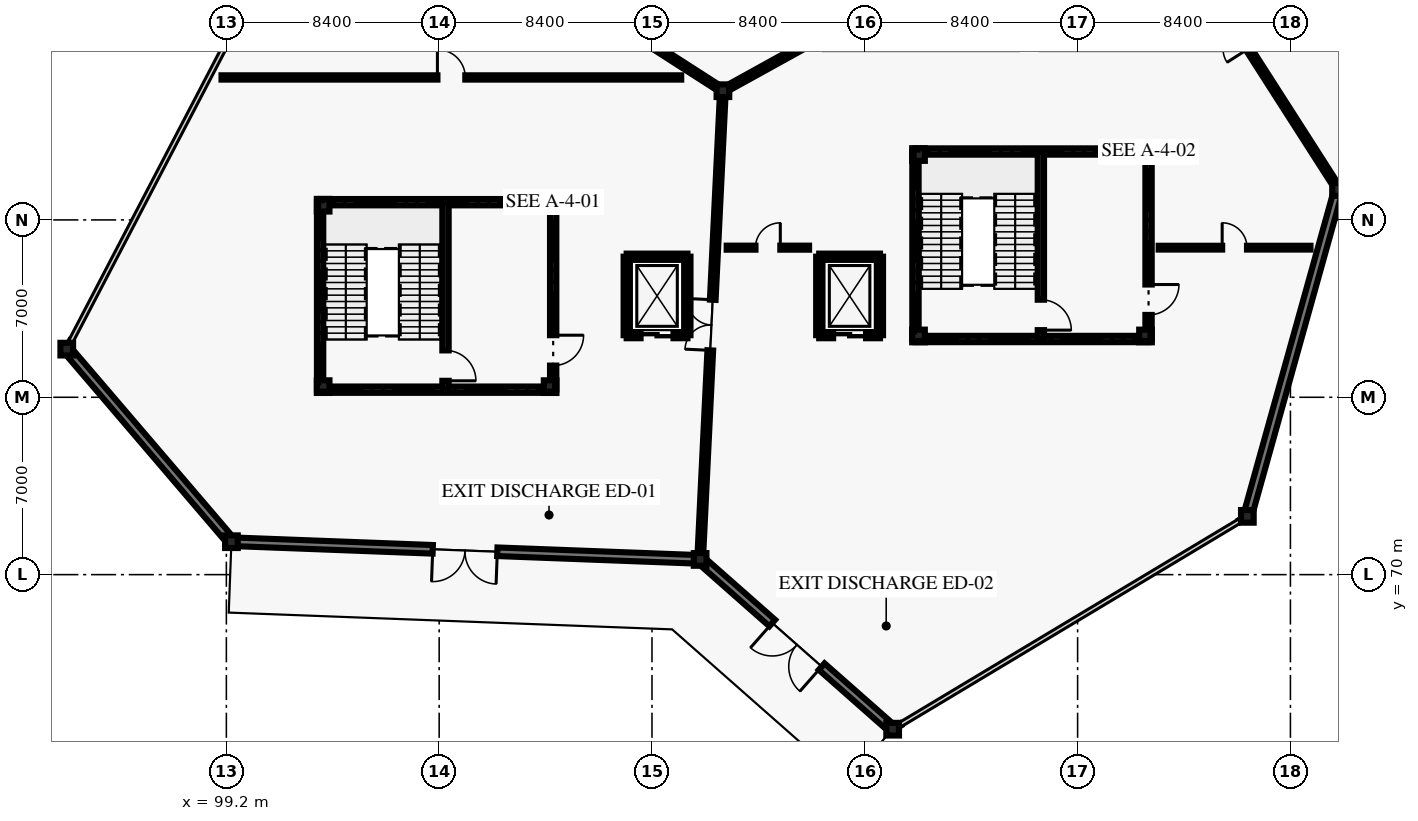
"""IFC4 building model, lengths in metres.
Left out: names, types, materials, properties, quantities, classifications, styles, units other than length and angle.
Written with IfcOpenShell. Run it as: python <this file> out.ifc"""

import sys

from ifc_helpers import new_model, si_unit, direction, frame, frame_2d, origin, origin_2d, place, context, subcontext, project, spatial, rectangle, i_section, extrude, element, fill, save


model = new_model("IFC4")
c1 = context("Model", 3, precision=1e-05, world=origin(), true_north=direction((0.0, 1.0)))
c2 = subcontext(c1, "Body", "Model", "MODEL_VIEW")
j1 = project(units=[si_unit("LENGTHUNIT", "METRE"), si_unit("PLANEANGLEUNIT", "RADIAN")], contexts=[c1])
p1 = place(None, origin())
s1 = spatial("IfcSite", under=j1, at=p1, CompositionType="ELEMENT")
p2 = place(p1, origin())
s2 = spatial("IfcBuilding", under=s1, at=p2, CompositionType="ELEMENT")
p3 = place(p2, origin())
s3 = spatial("IfcBuildingStorey", under=s2, at=p3, CompositionType="ELEMENT", Elevation=0.0)
for number, where, z_axis, x_axis in (
    (1, (92.9, 78.9, 0.0), (0.0, 0.0, 1.0), (1.0, 0.0, 0.0)),
    (2, (99.4, 71.3, 0.0), (0.0, 0.0, 1.0), (1.0, 0.0, 0.0)),
    (3, (117.9, 70.6, 0.0), (0.0, 0.0, 1.0), (1.0, 0.0, 0.0)),
    (4, (118.8, 89.1, 0.0), (0.0, 0.0, 1.0), (1.0, 0.0, 0.0)),
    (5, (125.5, 63.9, 0.0), (0.0, 0.0, 1.0), (1.0, 0.0, 0.0)),
    (6, (139.5, 72.3, 0.0), (0.0, 0.0, 1.0), (1.0, 0.0, 0.0)),
    (7, (143.1, 85.2, 0.0), (0.0, 0.0, 1.0), (1.0, 0.0, 0.0)),
    (8, (103.02, 77.42, 0.0), (0.0, 0.0, 1.0), (1.0, 0.0, 0.0)),
    (9, (111.98, 77.42, 0.0), (0.0, 0.0, 1.0), (1.0, 0.0, 0.0)),
    (10, (111.98, 84.58, 0.0), (0.0, 0.0, 1.0), (1.0, 0.0, 0.0)),
    (11, (103.02, 84.58, 0.0), (0.0, 0.0, 1.0), (1.0, 0.0, 0.0)),
    (12, (126.52, 79.42, 0.0), (0.0, 0.0, 1.0), (1.0, 0.0, 0.0)),
    (13, (135.48, 79.42, 0.0), (0.0, 0.0, 1.0), (1.0, 0.0, 0.0)),
    (14, (135.48, 86.58, 0.0), (0.0, 0.0, 1.0), (1.0, 0.0, 0.0)),
    (15, (126.52, 86.58, 0.0), (0.0, 0.0, 1.0), (1.0, 0.0, 0.0)),
):
    element("IfcColumn", number, at=place(p3, frame(where, z_axis=z_axis, x_axis=x_axis)), inside=s3, PredefinedType="COLUMN", context=c2, shape_type="SweptSolid", body=[
        extrude(i_section(OverallWidth=0.5, OverallDepth=0.5, WebThickness=0.022, FlangeThickness=0.036, at=origin_2d()), origin(), (0.0, 0.0, 1.0), 5.4),
    ])
p4 = place(p3, frame((117.84, 70.602, 0.0), z_axis=(0.0, 0.0, 1.0), x_axis=(-0.999284381651, 0.037824920194, 0.0)))
e16 = element("IfcWall", 16, at=p4, inside=s3, PredefinedType="SOLIDWALL", context=c2, shape_type="SweptSolid", body=[
    extrude(rectangle(XDim=18.453, YDim=0.34, at=frame_2d((9.227, 0.0))), origin(), (0.0, 0.0, 1.0), 4.22),
])
p5 = place(p4, frame((7.951, 0.0, 0.0)))
e17 = element("IfcOpeningElement", 17, at=p5, cuts=e16, PredefinedType="OPENING", context=c2, shape_type="SweptSolid", body=[
    extrude(rectangle(XDim=2.55, YDim=2.5, at=frame_2d((1.275, 1.25))), frame((0.0, 0.18, 0.0), z_axis=(0.0, -1.0, 0.0), x_axis=(1.0, 0.0, 0.0)), (0.0, 0.0, 1.0), 0.36),
])
p6 = place(p3, frame((92.919, 78.937, 0.0), z_axis=(0.0, 0.0, 1.0), x_axis=(0.464243799771, 0.885707454171, 0.0)))
e18 = element("IfcWall", 18, at=p6, inside=s3, PredefinedType="SOLIDWALL", context=c2, shape_type="SweptSolid", body=[
    extrude(rectangle(XDim=0.308, YDim=0.095, at=frame_2d((0.154, 0.0))), origin(), (0.0, 0.0, 1.0), 4.22),
])
p7 = place(p3, frame((99.4, 71.3, 0.0), z_axis=(0.0, 0.0, 1.0), x_axis=(-0.649974737731, 0.75995581471, 0.0)))
e19 = element("IfcWall", 19, at=p7, inside=s3, PredefinedType="SOLIDWALL", context=c2, shape_type="SweptSolid", body=[
    extrude(rectangle(XDim=10.0, YDim=0.34, at=frame_2d((5.0, 0.0))), origin(), (0.0, 0.0, 1.0), 4.22),
])
p8 = place(p3, frame((125.5, 63.9, 0.0), z_axis=(0.0, 0.0, 1.0), x_axis=(-0.750131359252, 0.661288850554, 0.0)))
e20 = element("IfcWall", 20, at=p8, inside=s3, PredefinedType="SOLIDWALL", context=c2, shape_type="SweptSolid", body=[
    extrude(rectangle(XDim=10.072, YDim=0.34, at=frame_2d((5.036, 0.0))), origin(), (0.0, 0.0, 1.0), 4.22),
])
p9 = place(p8, frame((3.736, 0.0, 0.0)))
e21 = element("IfcOpeningElement", 21, at=p9, cuts=e20, PredefinedType="OPENING", context=c2, shape_type="SweptSolid", body=[
    extrude(rectangle(XDim=2.6, YDim=2.55, at=frame_2d((1.3, 1.275))), frame((0.0, 0.18, 0.0), z_axis=(0.0, -1.0, 0.0), x_axis=(1.0, 0.0, 0.0)), (0.0, 0.0, 1.0), 0.36),
])
for number, where, z_axis, x_axis in (
    (22, (139.464, 72.278, 0.0), (0.0, 0.0, 1.0), (-0.858, -0.513, 0.0)),
    (23, (125.8, 64.08, 0.0), (0.0, 0.0, 1.0), (-0.858, -0.513, 0.0)),
):
    element("IfcWall", number, at=place(p3, frame(where, z_axis=z_axis, x_axis=x_axis)), inside=s3, PredefinedType="SOLIDWALL", context=c2, shape_type="SweptSolid", body=[
        extrude(rectangle(XDim=0.308, YDim=0.095, at=frame_2d((0.154, 0.0))), origin(), (0.0, 0.0, 1.0), 4.22),
    ])
p10 = place(p3, frame((143.084, 85.142, 0.0), z_axis=(0.0, 0.0, 1.0), x_axis=(-0.268810029922, -0.963193214165, 0.0)))
e24 = element("IfcWall", 24, at=p10, inside=s3, PredefinedType="SOLIDWALL", context=c2, shape_type="SweptSolid", body=[
    extrude(rectangle(XDim=13.333, YDim=0.34, at=frame_2d((6.667, 0.0))), origin(), (0.0, 0.0, 1.0), 4.22),
])
p11 = place(p3, frame((117.9, 70.6, 0.0), z_axis=(0.0, 0.0, 1.0), x_axis=(0.048599072515, 0.998818366947, 0.0)))
e25 = element("IfcWall", 25, at=p11, inside=s3, PredefinedType="SOLIDWALL", context=c2, shape_type="SweptSolid", body=[
    extrude(rectangle(XDim=18.522, YDim=0.225, at=frame_2d((9.261, 0.0))), origin(), (0.0, 0.0, 1.0), 4.62),
])
p12 = place(p11, frame((8.261, 0.0, 0.0)))
e26 = element("IfcOpeningElement", 26, at=p12, cuts=e25, PredefinedType="OPENING", context=c2, shape_type="SweptSolid", body=[
    extrude(rectangle(XDim=2.0, YDim=2.5, at=frame_2d((1.0, 1.25))), frame((0.0, 0.123, 0.0), z_axis=(0.0, -1.0, 0.0), x_axis=(1.0, 0.0, 0.0)), (0.0, 0.0, 1.0), 0.245),
])
p13 = place(p3, frame((118.8, 89.1, 0.0), z_axis=(0.0, 0.0, 1.0), x_axis=(-0.841183241423, 0.540750177392, 0.0)))
e27 = element("IfcWall", 27, at=p13, inside=s3, PredefinedType="SOLIDWALL", context=c2, shape_type="SweptSolid", body=[
    extrude(rectangle(XDim=18.308, YDim=0.225, at=frame_2d((9.154, 0.0))), origin(), (0.0, 0.0, 1.0), 4.62),
])
p14 = place(p13, frame((8.229, 0.0, 0.0)))
e28 = element("IfcOpeningElement", 28, at=p14, cuts=e27, PredefinedType="OPENING", context=c2, shape_type="SweptSolid", body=[
    extrude(rectangle(XDim=1.85, YDim=2.4, at=frame_2d((0.925, 1.2))), frame((0.0, 0.123, 0.0), z_axis=(0.0, -1.0, 0.0), x_axis=(1.0, 0.0, 0.0)), (0.0, 0.0, 1.0), 0.245),
])
p15 = place(p3, frame((134.9, 98.0, 0.0), z_axis=(0.0, 0.0, 1.0), x_axis=(-0.875181353329, -0.483794996652, 0.0)))
e29 = element("IfcWall", 29, at=p15, inside=s3, PredefinedType="SOLIDWALL", context=c2, shape_type="SweptSolid", body=[
    extrude(rectangle(XDim=18.396, YDim=0.225, at=frame_2d((9.198, 0.0))), origin(), (0.0, 0.0, 1.0), 4.62),
])
p16 = place(p15, frame((8.098, 0.0, 0.0)))
e30 = element("IfcOpeningElement", 30, at=p16, cuts=e29, PredefinedType="OPENING", context=c2, shape_type="SweptSolid", body=[
    extrude(rectangle(XDim=2.2, YDim=2.6, at=frame_2d((1.1, 1.3))), frame((0.0, 0.123, 0.0), z_axis=(0.0, -1.0, 0.0), x_axis=(1.0, 0.0, 0.0)), (0.0, 0.0, 1.0), 0.245),
])
p17 = place(p3, frame((143.1, 85.2, 0.0), z_axis=(0.0, 0.0, 1.0), x_axis=(-0.539434641352, 0.842027474439, 0.0)))
e31 = element("IfcWall", 31, at=p17, inside=s3, PredefinedType="SOLIDWALL", context=c2, shape_type="SweptSolid", body=[
    extrude(rectangle(XDim=15.201, YDim=0.225, at=frame_2d((7.601, 0.0))), origin(), (0.0, 0.0, 1.0), 4.62),
])
p18 = place(p17, frame((6.601, 0.0, 0.0)))
e32 = element("IfcOpeningElement", 32, at=p18, cuts=e31, PredefinedType="OPENING", context=c2, shape_type="SweptSolid", body=[
    extrude(rectangle(XDim=2.0, YDim=2.5, at=frame_2d((1.0, 1.25))), frame((0.0, 0.123, 0.0), z_axis=(0.0, -1.0, 0.0), x_axis=(1.0, 0.0, 0.0)), (0.0, 0.0, 1.0), 0.245),
])
p19 = place(p3, frame((99.009, 89.623, 0.0), z_axis=(0.0, 0.0, 1.0), x_axis=(1.0, 0.0, 0.0)))
e33 = element("IfcWall", 33, at=p19, inside=s3, PredefinedType="PARTITIONING", context=c2, shape_type="SweptSolid", body=[
    extrude(rectangle(XDim=18.145, YDim=0.17, at=frame_2d((9.073, 0.0))), origin(), (0.0, 0.0, 1.0), 3.92),
])
p20 = place(p19, frame((8.522, 0.0, 0.0)))
e34 = element("IfcOpeningElement", 34, at=p20, cuts=e33, PredefinedType="OPENING", context=c2, shape_type="SweptSolid", body=[
    extrude(rectangle(XDim=1.1, YDim=2.2, at=frame_2d((0.55, 1.1))), frame((0.0, 0.095, 0.0), z_axis=(0.0, -1.0, 0.0), x_axis=(1.0, 0.0, 0.0)), (0.0, 0.0, 1.0), 0.19),
])
p21 = place(p3, frame((118.949, 82.905, 0.0), z_axis=(0.0, 0.0, 1.0), x_axis=(1.0, 0.0, 0.0)))
e35 = element("IfcWall", 35, at=p21, inside=s3, PredefinedType="PARTITIONING", context=c2, shape_type="SweptSolid", body=[
    extrude(rectangle(XDim=3.251, YDim=0.16, at=frame_2d((1.625, 0.0))), origin(), (0.0, 0.0, 1.0), 3.92),
])
p22 = place(p21, frame((1.136, 0.0, 0.0)))
e36 = element("IfcOpeningElement", 36, at=p22, cuts=e35, PredefinedType="OPENING", context=c2, shape_type="SweptSolid", body=[
    extrude(rectangle(XDim=0.98, YDim=2.15, at=frame_2d((0.49, 1.075))), frame((0.0, 0.09, 0.0), z_axis=(0.0, -1.0, 0.0), x_axis=(1.0, 0.0, 0.0)), (0.0, 0.0, 1.0), 0.18),
])
p23 = place(p3, frame((136.0, 82.905, 0.0), z_axis=(0.0, 0.0, 1.0), x_axis=(1.0, 0.0, 0.0)))
e37 = element("IfcWall", 37, at=p23, inside=s3, PredefinedType="PARTITIONING", context=c2, shape_type="SweptSolid", body=[
    extrude(rectangle(XDim=5.992, YDim=0.15, at=frame_2d((2.996, 0.0))), origin(), (0.0, 0.0, 1.0), 3.92),
])
p24 = place(p23, frame((2.506, 0.0, 0.0)))
e38 = element("IfcOpeningElement", 38, at=p24, cuts=e37, PredefinedType="OPENING", context=c2, shape_type="SweptSolid", body=[
    extrude(rectangle(XDim=0.98, YDim=2.15, at=frame_2d((0.49, 1.075))), frame((0.0, 0.085, 0.0), z_axis=(0.0, -1.0, 0.0), x_axis=(1.0, 0.0, 0.0)), (0.0, 0.0, 1.0), 0.17),
])
p25 = place(p3, frame((102.9, 77.3, 0.0), z_axis=(0.0, 0.0, 1.0), x_axis=(0.0, 1.0, 0.0)))
e39 = element("IfcWall", 39, at=p25, inside=s3, PredefinedType="SHEAR", context=c2, shape_type="SweptSolid", body=[
    extrude(rectangle(XDim=7.4, YDim=0.25, at=frame_2d((3.7, 0.0))), origin(), (0.0, 0.0, 1.0), 5.16),
])
for number, where, z_axis, x_axis in (
    (40, (102.9, 84.7, 0.0), (0.0, 0.0, 1.0), (1.0, 0.0, 0.0)),
    (41, (112.1, 77.3, 0.0), (0.0, 0.0, 1.0), (-1.0, 0.0, 0.0)),
):
    element("IfcWall", number, at=place(p3, frame(where, z_axis=z_axis, x_axis=x_axis)), inside=s3, PredefinedType="SHEAR", context=c2, shape_type="SweptSolid", body=[
        extrude(rectangle(XDim=9.2, YDim=0.25, at=frame_2d((4.6, 0.0))), origin(), (0.0, 0.0, 1.0), 5.16),
    ])
p26 = place(p3, frame((112.1, 84.7, 0.0), z_axis=(0.0, 0.0, 1.0), x_axis=(0.0, -1.0, 0.0)))
e42 = element("IfcWall", 42, at=p26, inside=s3, PredefinedType="SHEAR", context=c2, shape_type="SweptSolid", body=[
    extrude(rectangle(XDim=7.4, YDim=0.25, at=frame_2d((3.7, 0.0))), origin(), (0.0, 0.0, 1.0), 5.16),
])
p27 = place(p26, frame((5.25, 0.0, 0.0)))
e43 = element("IfcOpeningElement", 43, at=p27, cuts=e42, PredefinedType="OPENING", context=c2, shape_type="SweptSolid", body=[
    extrude(rectangle(XDim=1.2, YDim=2.2, at=frame_2d((0.6, 1.1))), frame((0.0, 0.135, 0.0), z_axis=(0.0, -1.0, 0.0), x_axis=(1.0, 0.0, 0.0)), (0.0, 0.0, 1.0), 0.27),
])
p28 = place(p3, frame((107.85, 84.7, 0.0), z_axis=(0.0, 0.0, 1.0), x_axis=(0.0, -1.0, 0.0)))
e44 = element("IfcWall", 44, at=p28, inside=s3, PredefinedType="SHEAR", context=c2, shape_type="SweptSolid", body=[
    extrude(rectangle(XDim=7.4, YDim=0.25, at=frame_2d((3.7, 0.0))), origin(), (0.0, 0.0, 1.0), 5.16),
])
p29 = place(p28, frame((5.85, 0.0, 0.0)))
e45 = element("IfcOpeningElement", 45, at=p29, cuts=e44, PredefinedType="OPENING", context=c2, shape_type="SweptSolid", body=[
    extrude(rectangle(XDim=1.2, YDim=2.2, at=frame_2d((0.6, 1.1))), frame((0.0, 0.135, 0.0), z_axis=(0.0, -1.0, 0.0), x_axis=(1.0, 0.0, 0.0)), (0.0, 0.0, 1.0), 0.27),
])
p30 = place(p3, frame((126.4, 79.3, 0.0), z_axis=(0.0, 0.0, 1.0), x_axis=(0.0, 1.0, 0.0)))
e46 = element("IfcWall", 46, at=p30, inside=s3, PredefinedType="SHEAR", context=c2, shape_type="SweptSolid", body=[
    extrude(rectangle(XDim=7.4, YDim=0.25, at=frame_2d((3.7, 0.0))), origin(), (0.0, 0.0, 1.0), 5.16),
])
for number, where, z_axis, x_axis in (
    (47, (126.4, 86.7, 0.0), (0.0, 0.0, 1.0), (1.0, 0.0, 0.0)),
    (48, (135.6, 79.3, 0.0), (0.0, 0.0, 1.0), (-1.0, 0.0, 0.0)),
):
    element("IfcWall", number, at=place(p3, frame(where, z_axis=z_axis, x_axis=x_axis)), inside=s3, PredefinedType="SHEAR", context=c2, shape_type="SweptSolid", body=[
        extrude(rectangle(XDim=9.2, YDim=0.25, at=frame_2d((4.6, 0.0))), origin(), (0.0, 0.0, 1.0), 5.16),
    ])
p31 = place(p3, frame((135.6, 86.7, 0.0), z_axis=(0.0, 0.0, 1.0), x_axis=(0.0, -1.0, 0.0)))
e49 = element("IfcWall", 49, at=p31, inside=s3, PredefinedType="SHEAR", context=c2, shape_type="SweptSolid", body=[
    extrude(rectangle(XDim=7.4, YDim=0.25, at=frame_2d((3.7, 0.0))), origin(), (0.0, 0.0, 1.0), 5.16),
])
p32 = place(p31, frame((5.25, 0.0, 0.0)))
e50 = element("IfcOpeningElement", 50, at=p32, cuts=e49, PredefinedType="OPENING", context=c2, shape_type="SweptSolid", body=[
    extrude(rectangle(XDim=1.2, YDim=2.2, at=frame_2d((0.6, 1.1))), frame((0.0, 0.135, 0.0), z_axis=(0.0, -1.0, 0.0), x_axis=(1.0, 0.0, 0.0)), (0.0, 0.0, 1.0), 0.27),
])
p33 = place(p3, frame((131.35, 86.7, 0.0), z_axis=(0.0, 0.0, 1.0), x_axis=(0.0, -1.0, 0.0)))
e51 = element("IfcWall", 51, at=p33, inside=s3, PredefinedType="SHEAR", context=c2, shape_type="SweptSolid", body=[
    extrude(rectangle(XDim=7.4, YDim=0.25, at=frame_2d((3.7, 0.0))), origin(), (0.0, 0.0, 1.0), 5.16),
])
p34 = place(p33, frame((5.85, 0.0, 0.0)))
e52 = element("IfcOpeningElement", 52, at=p34, cuts=e51, PredefinedType="OPENING", context=c2, shape_type="SweptSolid", body=[
    extrude(rectangle(XDim=1.2, YDim=2.2, at=frame_2d((0.6, 1.1))), frame((0.0, 0.135, 0.0), z_axis=(0.0, -1.0, 0.0), x_axis=(1.0, 0.0, 0.0)), (0.0, 0.0, 1.0), 0.27),
])
p35 = place(p3, frame((115.0, 82.55, 0.0), z_axis=(0.0, 0.0, 1.0), x_axis=(1.0, 0.0, 0.0)))
e53 = element("IfcWall", 53, at=p35, inside=s3, PredefinedType="SHEAR", context=c2, shape_type="SweptSolid", body=[
    extrude(rectangle(XDim=2.4, YDim=0.24, at=frame_2d((1.2, 0.0))), origin(), (0.0, 0.0, 1.0), 5.16),
])
for number, where, z_axis, x_axis in (
    (54, (117.4, 82.55, 0.0), (0.0, 0.0, 1.0), (0.0, -1.0, 0.0)),
    (55, (115.0, 79.45, 0.0), (0.0, 0.0, 1.0), (0.0, 1.0, 0.0)),
):
    element("IfcWall", number, at=place(p3, frame(where, z_axis=z_axis, x_axis=x_axis)), inside=s3, PredefinedType="SHEAR", context=c2, shape_type="SweptSolid", body=[
        extrude(rectangle(XDim=3.1, YDim=0.24, at=frame_2d((1.55, 0.0))), origin(), (0.0, 0.0, 1.0), 5.16),
    ])
p36 = place(p3, frame((117.4, 79.45, 0.0), z_axis=(0.0, 0.0, 1.0), x_axis=(-1.0, 0.0, 0.0)))
e56 = element("IfcWall", 56, at=p36, inside=s3, PredefinedType="SHEAR", context=c2, shape_type="SweptSolid", body=[
    extrude(rectangle(XDim=2.4, YDim=0.24, at=frame_2d((1.2, 0.0))), origin(), (0.0, 0.0, 1.0), 5.16),
])
p37 = place(p36, frame((0.55, 0.0, 0.0)))
e57 = element("IfcOpeningElement", 57, at=p37, cuts=e56, PredefinedType="OPENING", context=c2, shape_type="SweptSolid", body=[
    extrude(rectangle(XDim=1.3, YDim=2.25, at=frame_2d((0.65, 1.125))), frame((0.0, 0.13, 0.0), z_axis=(0.0, -1.0, 0.0), x_axis=(1.0, 0.0, 0.0)), (0.0, 0.0, 1.0), 0.26),
])
p38 = place(p3, frame((122.6, 82.55, 0.0), z_axis=(0.0, 0.0, 1.0), x_axis=(1.0, 0.0, 0.0)))
e58 = element("IfcWall", 58, at=p38, inside=s3, PredefinedType="SHEAR", context=c2, shape_type="SweptSolid", body=[
    extrude(rectangle(XDim=2.4, YDim=0.24, at=frame_2d((1.2, 0.0))), origin(), (0.0, 0.0, 1.0), 5.16),
])
for number, where, z_axis, x_axis in (
    (59, (125.0, 82.55, 0.0), (0.0, 0.0, 1.0), (0.0, -1.0, 0.0)),
    (60, (122.6, 79.45, 0.0), (0.0, 0.0, 1.0), (0.0, 1.0, 0.0)),
):
    element("IfcWall", number, at=place(p3, frame(where, z_axis=z_axis, x_axis=x_axis)), inside=s3, PredefinedType="SHEAR", context=c2, shape_type="SweptSolid", body=[
        extrude(rectangle(XDim=3.1, YDim=0.24, at=frame_2d((1.55, 0.0))), origin(), (0.0, 0.0, 1.0), 5.16),
    ])
p39 = place(p3, frame((125.0, 79.45, 0.0), z_axis=(0.0, 0.0, 1.0), x_axis=(-1.0, 0.0, 0.0)))
e61 = element("IfcWall", 61, at=p39, inside=s3, PredefinedType="SHEAR", context=c2, shape_type="SweptSolid", body=[
    extrude(rectangle(XDim=2.4, YDim=0.24, at=frame_2d((1.2, 0.0))), origin(), (0.0, 0.0, 1.0), 5.16),
])
p40 = place(p39, frame((0.55, 0.0, 0.0)))
e62 = element("IfcOpeningElement", 62, at=p40, cuts=e61, PredefinedType="OPENING", context=c2, shape_type="SweptSolid", body=[
    extrude(rectangle(XDim=1.3, YDim=2.25, at=frame_2d((0.65, 1.125))), frame((0.0, 0.13, 0.0), z_axis=(0.0, -1.0, 0.0), x_axis=(1.0, 0.0, 0.0)), (0.0, 0.0, 1.0), 0.26),
])
p41 = place(p5, origin())
e63 = element("IfcDoor", 63, at=p41, inside=s3, OperationType="DOUBLE_DOOR_SINGLE_SWING", PredefinedType="DOOR", context=c2, shape_type="SweptSolid", body=[
    extrude(rectangle(XDim=2.55, YDim=2.5, at=frame_2d((1.275, 1.25))), frame((0.0, 0.025, 0.0), z_axis=(0.0, -1.0, 0.0), x_axis=(1.0, 0.0, 0.0)), (0.0, 0.0, 1.0), 0.05),
])
fill(e17, e63)
p42 = place(p9, origin())
e64 = element("IfcDoor", 64, at=p42, inside=s3, OperationType="DOUBLE_DOOR_SINGLE_SWING", PredefinedType="DOOR", context=c2, shape_type="SweptSolid", body=[
    extrude(rectangle(XDim=2.6, YDim=2.55, at=frame_2d((1.3, 1.275))), frame((0.0, 0.025, 0.0), z_axis=(0.0, -1.0, 0.0), x_axis=(1.0, 0.0, 0.0)), (0.0, 0.0, 1.0), 0.05),
])
fill(e21, e64)
p43 = place(p12, origin())
e65 = element("IfcDoor", 65, at=p43, inside=s3, OperationType="DOUBLE_DOOR_SINGLE_SWING", PredefinedType="DOOR", context=c2, shape_type="SweptSolid", body=[
    extrude(rectangle(XDim=2.0, YDim=2.5, at=frame_2d((1.0, 1.25))), frame((0.0, 0.025, 0.0), z_axis=(0.0, -1.0, 0.0), x_axis=(1.0, 0.0, 0.0)), (0.0, 0.0, 1.0), 0.05),
])
fill(e26, e65)
p44 = place(p20, origin())
e66 = element("IfcDoor", 66, at=p44, inside=s3, OperationType="SINGLE_SWING_LEFT", PredefinedType="DOOR", context=c2, shape_type="SweptSolid", body=[
    extrude(rectangle(XDim=1.1, YDim=2.2, at=frame_2d((0.55, 1.1))), frame((0.0, 0.025, 0.0), z_axis=(0.0, -1.0, 0.0), x_axis=(1.0, 0.0, 0.0)), (0.0, 0.0, 1.0), 0.05),
])
fill(e34, e66)
p45 = place(p22, origin())
e67 = element("IfcDoor", 67, at=p45, inside=s3, OperationType="SINGLE_SWING_RIGHT", PredefinedType="DOOR", context=c2, shape_type="SweptSolid", body=[
    extrude(rectangle(XDim=0.98, YDim=2.15, at=frame_2d((0.49, 1.075))), frame((0.0, 0.025, 0.0), z_axis=(0.0, -1.0, 0.0), x_axis=(1.0, 0.0, 0.0)), (0.0, 0.0, 1.0), 0.05),
])
fill(e36, e67)
p46 = place(p24, origin())
e68 = element("IfcDoor", 68, at=p46, inside=s3, OperationType="SINGLE_SWING_LEFT", PredefinedType="DOOR", context=c2, shape_type="SweptSolid", body=[
    extrude(rectangle(XDim=0.98, YDim=2.15, at=frame_2d((0.49, 1.075))), frame((0.0, 0.025, 0.0), z_axis=(0.0, -1.0, 0.0), x_axis=(1.0, 0.0, 0.0)), (0.0, 0.0, 1.0), 0.05),
])
fill(e38, e68)
p47 = place(p27, origin())
e69 = element("IfcDoor", 69, at=p47, inside=s3, OperationType="SINGLE_SWING_LEFT", PredefinedType="DOOR", context=c2, shape_type="SweptSolid", body=[
    extrude(rectangle(XDim=1.2, YDim=2.2, at=frame_2d((0.6, 1.1))), frame((0.0, 0.025, 0.0), z_axis=(0.0, -1.0, 0.0), x_axis=(1.0, 0.0, 0.0)), (0.0, 0.0, 1.0), 0.05),
])
fill(e43, e69)
p48 = place(p29, origin())
e70 = element("IfcDoor", 70, at=p48, inside=s3, OperationType="SINGLE_SWING_RIGHT", PredefinedType="DOOR", context=c2, shape_type="SweptSolid", body=[
    extrude(rectangle(XDim=1.2, YDim=2.2, at=frame_2d((0.6, 1.1))), frame((0.0, 0.025, 0.0), z_axis=(0.0, -1.0, 0.0), x_axis=(1.0, 0.0, 0.0)), (0.0, 0.0, 1.0), 0.05),
])
fill(e45, e70)
p49 = place(p32, origin())
e71 = element("IfcDoor", 71, at=p49, inside=s3, OperationType="SINGLE_SWING_LEFT", PredefinedType="DOOR", context=c2, shape_type="SweptSolid", body=[
    extrude(rectangle(XDim=1.2, YDim=2.2, at=frame_2d((0.6, 1.1))), frame((0.0, 0.025, 0.0), z_axis=(0.0, -1.0, 0.0), x_axis=(1.0, 0.0, 0.0)), (0.0, 0.0, 1.0), 0.05),
])
fill(e50, e71)
p50 = place(p34, origin())
e72 = element("IfcDoor", 72, at=p50, inside=s3, OperationType="SINGLE_SWING_RIGHT", PredefinedType="DOOR", context=c2, shape_type="SweptSolid", body=[
    extrude(rectangle(XDim=1.2, YDim=2.2, at=frame_2d((0.6, 1.1))), frame((0.0, 0.025, 0.0), z_axis=(0.0, -1.0, 0.0), x_axis=(1.0, 0.0, 0.0)), (0.0, 0.0, 1.0), 0.05),
])
fill(e52, e72)
p51 = place(p37, origin())
e73 = element("IfcDoor", 73, at=p51, inside=s3, OperationType="SLIDING_TO_LEFT", PredefinedType="DOOR", context=c2, shape_type="SweptSolid", body=[
    extrude(rectangle(XDim=1.3, YDim=2.25, at=frame_2d((0.65, 1.125))), frame((0.0, 0.025, 0.0), z_axis=(0.0, -1.0, 0.0), x_axis=(1.0, 0.0, 0.0)), (0.0, 0.0, 1.0), 0.05),
])
fill(e57, e73)
p52 = place(p40, origin())
e74 = element("IfcDoor", 74, at=p52, inside=s3, OperationType="SLIDING_TO_LEFT", PredefinedType="DOOR", context=c2, shape_type="SweptSolid", body=[
    extrude(rectangle(XDim=1.3, YDim=2.25, at=frame_2d((0.65, 1.125))), frame((0.0, 0.025, 0.0), z_axis=(0.0, -1.0, 0.0), x_axis=(1.0, 0.0, 0.0)), (0.0, 0.0, 1.0), 0.05),
])
fill(e62, e74)
save(model, sys.argv[1])
